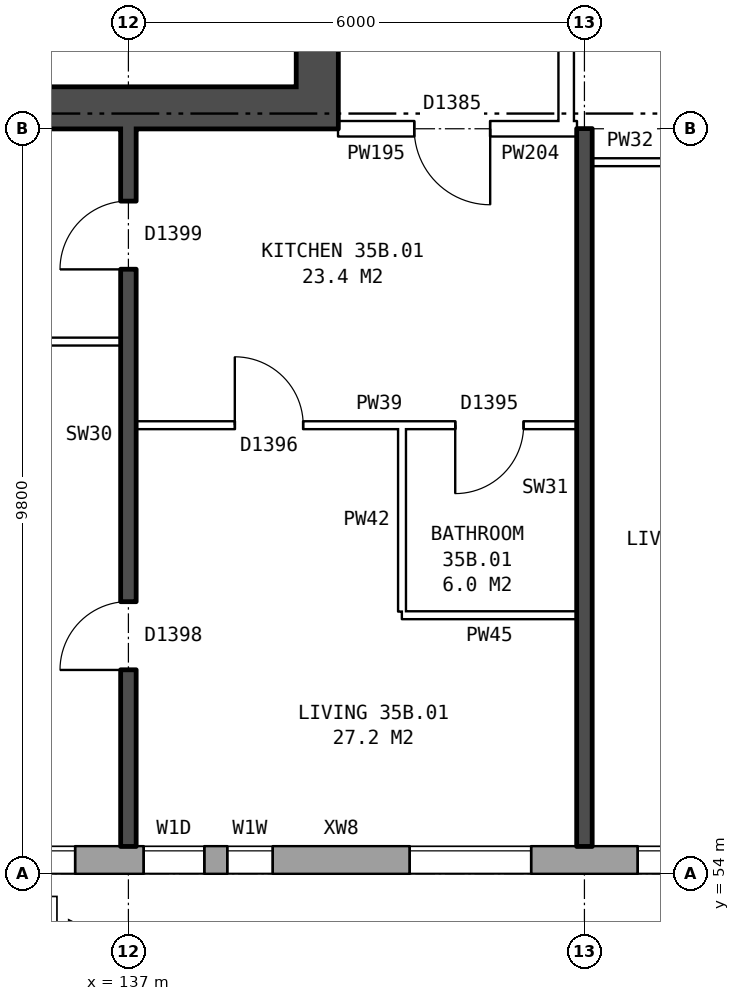
"""IFC4 building model, lengths in metres.
Left out: names, types, materials, properties, quantities, classifications, styles, units other than length and angle.
Written with IfcOpenShell. Run it as: python <this file> out.ifc"""

import sys

from ifc_helpers import new_model, si_unit, direction, frame, frame_2d, origin, place, context, subcontext, project, spatial, rectangle, extrude, element, fill, save


model = new_model("IFC4")
c1 = context("Model", 3, precision=1e-05, world=origin(), true_north=direction((0.0, 1.0)))
c2 = subcontext(c1, "Body", "Model", "MODEL_VIEW")
j1 = project(units=[si_unit("LENGTHUNIT", "METRE"), si_unit("PLANEANGLEUNIT", "RADIAN")], contexts=[c1])
p1 = place(None, origin())
s1 = spatial("IfcSite", under=j1, at=p1, CompositionType="ELEMENT")
p2 = place(p1, origin())
s2 = spatial("IfcBuilding", under=s1, at=p2, CompositionType="ELEMENT")
p3 = place(p2, frame((0.0, 0.0, 126.8)))
s3 = spatial("IfcBuildingStorey", under=s2, at=p3, CompositionType="ELEMENT", Elevation=126.8)
p4 = place(p3, frame((134.075, 54.18, 0.0), z_axis=(0.0, 0.0, 1.0), x_axis=(1.0, 0.0, 0.0)))
e1 = element("IfcWall", 1, at=p4, inside=s3, PredefinedType="STANDARD", context=c2, shape_type="SweptSolid", body=[
    extrude(rectangle(XDim=35.601, YDim=0.36, at=frame_2d((17.8, 0.0))), origin(), (0.0, 0.0, 1.0), 2.85),
])
p5 = place(p4, frame((0.625, 0.0, 0.8)))
e2 = element("IfcOpeningElement", 2, at=p5, cuts=e1, PredefinedType="OPENING", context=c2, shape_type="SweptSolid", body=[
    extrude(rectangle(XDim=1.6, YDim=1.8, at=frame_2d((0.8, 0.9))), frame((0.0, 0.19, 0.0), z_axis=(0.0, -1.0, 0.0), x_axis=(1.0, 0.0, 0.0)), (0.0, 0.0, 1.0), 0.38),
])
p6 = place(p4, frame((3.125, 0.0, 0.8)))
e3 = element("IfcOpeningElement", 3, at=p6, cuts=e1, PredefinedType="OPENING", context=c2, shape_type="SweptSolid", body=[
    extrude(rectangle(XDim=0.8, YDim=1.8, at=frame_2d((0.4, 0.9))), frame((0.0, 0.19, 0.0), z_axis=(0.0, -1.0, 0.0), x_axis=(1.0, 0.0, 0.0)), (0.0, 0.0, 1.0), 0.38),
])
p7 = place(p4, frame((6.625, 0.0, 0.8)))
e4 = element("IfcOpeningElement", 4, at=p7, cuts=e1, PredefinedType="OPENING", context=c2, shape_type="SweptSolid", body=[
    extrude(rectangle(XDim=1.6, YDim=1.8, at=frame_2d((0.8, 0.9))), frame((0.0, 0.19, 0.0), z_axis=(0.0, -1.0, 0.0), x_axis=(1.0, 0.0, 0.0)), (0.0, 0.0, 1.0), 0.38),
])
p8 = place(p4, frame((9.625, 0.0, 0.8)))
e5 = element("IfcOpeningElement", 5, at=p8, cuts=e1, PredefinedType="OPENING", context=c2, shape_type="SweptSolid", body=[
    extrude(rectangle(XDim=1.6, YDim=1.8, at=frame_2d((0.8, 0.9))), frame((0.0, 0.19, 0.0), z_axis=(0.0, -1.0, 0.0), x_axis=(1.0, 0.0, 0.0)), (0.0, 0.0, 1.0), 0.38),
])
p9 = place(p4, frame((12.625, 0.0, 0.8)))
e6 = element("IfcOpeningElement", 6, at=p9, cuts=e1, PredefinedType="OPENING", context=c2, shape_type="SweptSolid", body=[
    extrude(rectangle(XDim=1.6, YDim=1.8, at=frame_2d((0.8, 0.9))), frame((0.0, 0.19, 0.0), z_axis=(0.0, -1.0, 0.0), x_axis=(1.0, 0.0, 0.0)), (0.0, 0.0, 1.0), 0.38),
])
p10 = place(p4, frame((15.625, 0.0, 0.8)))
e7 = element("IfcOpeningElement", 7, at=p10, cuts=e1, PredefinedType="OPENING", context=c2, shape_type="SweptSolid", body=[
    extrude(rectangle(XDim=1.6, YDim=1.8, at=frame_2d((0.8, 0.9))), frame((0.0, 0.19, 0.0), z_axis=(0.0, -1.0, 0.0), x_axis=(1.0, 0.0, 0.0)), (0.0, 0.0, 1.0), 0.38),
])
p11 = place(p4, frame((18.625, 0.0, 0.8)))
e8 = element("IfcOpeningElement", 8, at=p11, cuts=e1, PredefinedType="OPENING", context=c2, shape_type="SweptSolid", body=[
    extrude(rectangle(XDim=1.6, YDim=1.8, at=frame_2d((0.8, 0.9))), frame((0.0, 0.19, 0.0), z_axis=(0.0, -1.0, 0.0), x_axis=(1.0, 0.0, 0.0)), (0.0, 0.0, 1.0), 0.38),
])
p12 = place(p4, frame((21.625, 0.0, 0.8)))
e9 = element("IfcOpeningElement", 9, at=p12, cuts=e1, PredefinedType="OPENING", context=c2, shape_type="SweptSolid", body=[
    extrude(rectangle(XDim=1.6, YDim=1.8, at=frame_2d((0.8, 0.9))), frame((0.0, 0.19, 0.0), z_axis=(0.0, -1.0, 0.0), x_axis=(1.0, 0.0, 0.0)), (0.0, 0.0, 1.0), 0.38),
])
p13 = place(p4, frame((24.625, 0.0, 0.8)))
e10 = element("IfcOpeningElement", 10, at=p13, cuts=e1, PredefinedType="OPENING", context=c2, shape_type="SweptSolid", body=[
    extrude(rectangle(XDim=1.6, YDim=1.8, at=frame_2d((0.8, 0.9))), frame((0.0, 0.19, 0.0), z_axis=(0.0, -1.0, 0.0), x_axis=(1.0, 0.0, 0.0)), (0.0, 0.0, 1.0), 0.38),
])
p14 = place(p4, frame((27.125, 0.0, 0.8)))
e11 = element("IfcOpeningElement", 11, at=p14, cuts=e1, PredefinedType="OPENING", context=c2, shape_type="SweptSolid", body=[
    extrude(rectangle(XDim=1.6, YDim=1.8, at=frame_2d((0.8, 0.9))), frame((0.0, 0.19, 0.0), z_axis=(0.0, -1.0, 0.0), x_axis=(1.0, 0.0, 0.0)), (0.0, 0.0, 1.0), 0.38),
])
p15 = place(p4, frame((29.025, 0.0, 0.8)))
e12 = element("IfcOpeningElement", 12, at=p15, cuts=e1, PredefinedType="OPENING", context=c2, shape_type="SweptSolid", body=[
    extrude(rectangle(XDim=0.6, YDim=0.9, at=frame_2d((0.3, 0.45))), frame((0.0, 0.19, 0.0), z_axis=(0.0, -1.0, 0.0), x_axis=(1.0, 0.0, 0.0)), (0.0, 0.0, 1.0), 0.38),
])
p16 = place(p4, frame((33.625, 0.0, 0.8)))
e13 = element("IfcOpeningElement", 13, at=p16, cuts=e1, PredefinedType="OPENING", context=c2, shape_type="SweptSolid", body=[
    extrude(rectangle(XDim=1.6, YDim=1.8, at=frame_2d((0.8, 0.9))), frame((0.0, 0.19, 0.0), z_axis=(0.0, -1.0, 0.0), x_axis=(1.0, 0.0, 0.0)), (0.0, 0.0, 1.0), 0.38),
])
p17 = place(p4, frame((4.225, 0.0, 1.6)))
e14 = element("IfcOpeningElement", 14, at=p17, cuts=e1, PredefinedType="OPENING", context=c2, shape_type="SweptSolid", body=[
    extrude(rectangle(XDim=0.6, YDim=0.9, at=frame_2d((0.3, 0.45))), frame((0.0, 0.19, 0.0), z_axis=(0.0, -1.0, 0.0), x_axis=(1.0, 0.0, 0.0)), (0.0, 0.0, 1.0), 0.38),
])
p18 = place(p4, frame((30.675, 0.0, 1.7)))
e15 = element("IfcOpeningElement", 15, at=p18, cuts=e1, PredefinedType="OPENING", context=c2, shape_type="SweptSolid", body=[
    extrude(rectangle(XDim=0.6, YDim=0.9, at=frame_2d((0.3, 0.45))), frame((0.0, 0.19, 0.0), z_axis=(0.0, -1.0, 0.0), x_axis=(1.0, 0.0, 0.0)), (0.0, 0.0, 1.0), 0.38),
])
p19 = place(p4, frame((31.575, 0.0, 0.8)))
e16 = element("IfcOpeningElement", 16, at=p19, cuts=e1, PredefinedType="OPENING", context=c2, shape_type="SweptSolid", body=[
    extrude(rectangle(XDim=1.0, YDim=1.8, at=frame_2d((0.5, 0.9))), frame((0.0, 0.19, 0.0), z_axis=(0.0, -1.0, 0.0), x_axis=(1.0, 0.0, 0.0)), (0.0, 0.0, 1.0), 0.38),
])
p20 = place(p3, frame((139.485, 63.8, 0.0), z_axis=(0.0, 0.0, 1.0), x_axis=(0.0, 1.0, 0.0)))
e17 = element("IfcWall", 17, at=p20, inside=s3, PredefinedType="SHEAR", context=c2, shape_type="SweptSolid", body=[
    extrude(rectangle(XDim=12.4, YDim=0.55, at=frame_2d((6.2, 0.0))), origin(), (0.0, 0.0, 1.0), 2.85),
])
p21 = place(p20, frame((1.325, 0.0, 0.0)))
e18 = element("IfcOpeningElement", 18, at=p21, cuts=e17, PredefinedType="OPENING", context=c2, shape_type="SweptSolid", body=[
    extrude(rectangle(XDim=1.1, YDim=2.1, at=frame_2d((0.55, 1.05))), frame((0.0, 0.285, 0.0), z_axis=(0.0, -1.0, 0.0), x_axis=(1.0, 0.0, 0.0)), (0.0, 0.0, 1.0), 0.57),
])
p22 = place(p20, frame((3.6, 0.0, 0.0)))
e19 = element("IfcOpeningElement", 19, at=p22, cuts=e17, PredefinedType="OPENING", context=c2, shape_type="SweptSolid", body=[
    extrude(rectangle(XDim=1.1, YDim=2.1, at=frame_2d((0.55, 1.05))), frame((0.0, 0.285, 0.0), z_axis=(0.0, -1.0, 0.0), x_axis=(1.0, 0.0, 0.0)), (0.0, 0.0, 1.0), 0.57),
])
p23 = place(p20, frame((5.8, 0.0, 0.0)))
e20 = element("IfcOpeningElement", 20, at=p23, cuts=e17, PredefinedType="OPENING", context=c2, shape_type="SweptSolid", body=[
    extrude(rectangle(XDim=1.1, YDim=2.1, at=frame_2d((0.55, 1.05))), frame((0.0, 0.285, 0.0), z_axis=(0.0, -1.0, 0.0), x_axis=(1.0, 0.0, 0.0)), (0.0, 0.0, 1.0), 0.57),
])
p24 = place(p20, frame((9.9, 0.0, 0.0)))
e21 = element("IfcOpeningElement", 21, at=p24, cuts=e17, PredefinedType="OPENING", context=c2, shape_type="SweptSolid", body=[
    extrude(rectangle(XDim=1.1, YDim=2.1, at=frame_2d((0.55, 1.05))), frame((0.0, 0.285, 0.0), z_axis=(0.0, -1.0, 0.0), x_axis=(1.0, 0.0, 0.0)), (0.0, 0.0, 1.0), 0.57),
])
p25 = place(p20, frame((8.125, 0.0, 0.0)))
e22 = element("IfcOpeningElement", 22, at=p25, cuts=e17, PredefinedType="OPENING", context=c2, shape_type="SweptSolid", body=[
    extrude(rectangle(XDim=0.85, YDim=2.1, at=frame_2d((0.425, 1.05))), frame((0.0, 0.285, 0.0), z_axis=(0.0, -1.0, 0.0), x_axis=(1.0, 0.0, 0.0)), (0.0, 0.0, 1.0), 0.57),
])
p26 = place(p3, frame((139.21, 64.075, 0.0), z_axis=(0.0, 0.0, 1.0), x_axis=(-1.0, 0.0, 0.0)))
e23 = element("IfcWall", 23, at=p26, inside=s3, PredefinedType="SHEAR", context=c2, shape_type="SweptSolid", body=[
    extrude(rectangle(XDim=7.3, YDim=0.55, at=frame_2d((3.65, 0.0))), origin(), (0.0, 0.0, 1.0), 2.85),
])
p27 = place(p3, frame((142.76, 63.9, 0.0), z_axis=(0.0, 0.0, 1.0), x_axis=(0.0, 1.0, 0.0)))
e24 = element("IfcWall", 24, at=p27, inside=s3, PredefinedType="PARTITIONING", context=c2, shape_type="SweptSolid", body=[
    extrude(rectangle(XDim=12.2, YDim=0.2, at=frame_2d((6.1, 0.0))), origin(), (0.0, 0.0, 1.0), 2.85),
])
p28 = place(p27, frame((5.1, 0.0, 0.0)))
e25 = element("IfcOpeningElement", 25, at=p28, cuts=e24, PredefinedType="OPENING", context=c2, shape_type="SweptSolid", body=[
    extrude(rectangle(XDim=2.0, YDim=2.1, at=frame_2d((1.0, 1.05))), frame((0.0, 0.11, 0.0), z_axis=(0.0, -1.0, 0.0), x_axis=(1.0, 0.0, 0.0)), (0.0, 0.0, 1.0), 0.22),
])
p29 = place(p3, frame((140.6, 57.4, 0.0), z_axis=(0.0, 0.0, 1.0), x_axis=(1.0, 0.0, 0.0)))
e26 = element("IfcWall", 26, at=p29, inside=s3, PredefinedType="PARTITIONING", context=c2, shape_type="SweptSolid", body=[
    extrude(rectangle(XDim=2.3, YDim=0.1, at=frame_2d((1.15, 0.0))), origin(), (0.0, 0.0, 1.0), 2.85),
])
p30 = place(p3, frame((137.1, 59.9, 0.0), z_axis=(0.0, 0.0, 1.0), x_axis=(1.0, 0.0, 0.0)))
e27 = element("IfcWall", 27, at=p30, inside=s3, PredefinedType="PARTITIONING", context=c2, shape_type="SweptSolid", body=[
    extrude(rectangle(XDim=5.8, YDim=0.1, at=frame_2d((2.9, 0.0))), origin(), (0.0, 0.0, 1.0), 2.85),
])
p31 = place(p30, frame((1.3, 0.0, 0.0)))
e28 = element("IfcOpeningElement", 28, at=p31, cuts=e27, PredefinedType="OPENING", context=c2, shape_type="SweptSolid", body=[
    extrude(rectangle(XDim=0.9, YDim=2.1, at=frame_2d((0.45, 1.05))), frame((0.0, 0.06, 0.0), z_axis=(0.0, -1.0, 0.0), x_axis=(1.0, 0.0, 0.0)), (0.0, 0.0, 1.0), 0.12),
])
p32 = place(p30, frame((4.2, 0.0, 0.0)))
e29 = element("IfcOpeningElement", 29, at=p32, cuts=e27, PredefinedType="OPENING", context=c2, shape_type="SweptSolid", body=[
    extrude(rectangle(XDim=0.9, YDim=2.1, at=frame_2d((0.45, 1.05))), frame((0.0, 0.06, 0.0), z_axis=(0.0, -1.0, 0.0), x_axis=(1.0, 0.0, 0.0)), (0.0, 0.0, 1.0), 0.12),
])
p33 = place(p3, frame((131.36, 61.0, 0.0), z_axis=(0.0, 0.0, 1.0), x_axis=(1.0, 0.0, 0.0)))
e30 = element("IfcWall", 30, at=p33, inside=s3, PredefinedType="PARTITIONING", context=c2, shape_type="SweptSolid", body=[
    extrude(rectangle(XDim=5.54, YDim=0.1, at=frame_2d((2.77, 0.0))), origin(), (0.0, 0.0, 1.0), 2.85),
])
p34 = place(p3, frame((143.1, 63.36, 0.0), z_axis=(0.0, 0.0, 1.0), x_axis=(1.0, 0.0, 0.0)))
e31 = element("IfcWall", 31, at=p34, inside=s3, PredefinedType="PARTITIONING", context=c2, shape_type="SweptSolid", body=[
    extrude(rectangle(XDim=2.9, YDim=0.1, at=frame_2d((1.45, 0.0))), origin(), (0.0, 0.0, 1.0), 2.85),
])
p35 = place(p34, frame((1.0, 0.0, 0.0)))
e32 = element("IfcOpeningElement", 32, at=p35, cuts=e31, PredefinedType="OPENING", context=c2, shape_type="SweptSolid", body=[
    extrude(rectangle(XDim=0.9, YDim=2.1, at=frame_2d((0.45, 1.05))), frame((0.0, 0.06, 0.0), z_axis=(0.0, -1.0, 0.0), x_axis=(1.0, 0.0, 0.0)), (0.0, 0.0, 1.0), 0.12),
])
p36 = place(p3, frame((139.76, 63.8, 0.0), z_axis=(0.0, 0.0, 1.0), x_axis=(1.0, 0.0, 0.0)))
e33 = element("IfcWall", 33, at=p36, inside=s3, PredefinedType="PARTITIONING", context=c2, shape_type="SweptSolid", body=[
    extrude(rectangle(XDim=3.0, YDim=0.2, at=frame_2d((1.5, 0.0))), origin(), (0.0, 0.0, 1.0), 2.85),
])
p37 = place(p36, frame((1.0, 0.0, 0.0)))
e34 = element("IfcOpeningElement", 34, at=p37, cuts=e33, PredefinedType="OPENING", context=c2, shape_type="SweptSolid", body=[
    extrude(rectangle(XDim=1.0, YDim=2.1, at=frame_2d((0.5, 1.05))), frame((0.0, 0.11, 0.0), z_axis=(0.0, -1.0, 0.0), x_axis=(1.0, 0.0, 0.0)), (0.0, 0.0, 1.0), 0.22),
])
p38 = place(p3, frame((142.76, 63.8, 0.0), z_axis=(0.0, 0.0, 1.0), x_axis=(1.0, 0.0, 0.0)))
e35 = element("IfcWall", 35, at=p38, inside=s3, PredefinedType="PARTITIONING", context=c2, shape_type="SweptSolid", body=[
    extrude(rectangle(XDim=0.14, YDim=0.2, at=frame_2d((0.07, 0.0))), origin(), (0.0, 0.0, 1.0), 2.85),
])
p39 = place(p3, frame((137.0, 54.36, 0.0), z_axis=(0.0, 0.0, 1.0), x_axis=(0.0, 1.0, 0.0)))
e36 = element("IfcWall", 36, at=p39, inside=s3, PredefinedType="SOLIDWALL", context=c2, shape_type="SweptSolid", body=[
    extrude(rectangle(XDim=9.44, YDim=0.2, at=frame_2d((4.72, 0.0))), origin(), (0.0, 0.0, 1.0), 2.85),
])
p40 = place(p39, frame((2.32, 0.0, 0.0)))
e37 = element("IfcOpeningElement", 37, at=p40, cuts=e36, PredefinedType="OPENING", context=c2, shape_type="SweptSolid", body=[
    extrude(rectangle(XDim=0.9, YDim=2.1, at=frame_2d((0.45, 1.05))), frame((0.0, 0.11, 0.0), z_axis=(0.0, -1.0, 0.0), x_axis=(1.0, 0.0, 0.0)), (0.0, 0.0, 1.0), 0.22),
])
p41 = place(p39, frame((7.59, 0.0, 0.0)))
e38 = element("IfcOpeningElement", 38, at=p41, cuts=e36, PredefinedType="OPENING", context=c2, shape_type="SweptSolid", body=[
    extrude(rectangle(XDim=0.9, YDim=2.1, at=frame_2d((0.45, 1.05))), frame((0.0, 0.11, 0.0), z_axis=(0.0, -1.0, 0.0), x_axis=(1.0, 0.0, 0.0)), (0.0, 0.0, 1.0), 0.22),
])
p42 = place(p3, frame((140.6, 57.45, 0.0), z_axis=(0.0, 0.0, 1.0), x_axis=(0.0, 1.0, 0.0)))
e39 = element("IfcWall", 39, at=p42, inside=s3, PredefinedType="PARTITIONING", context=c2, shape_type="SweptSolid", body=[
    extrude(rectangle(XDim=2.4, YDim=0.1, at=frame_2d((1.2, 0.0))), origin(), (0.0, 0.0, 1.0), 2.85),
])
p43 = place(p3, frame((143.0, 54.36, 0.0), z_axis=(0.0, 0.0, 1.0), x_axis=(0.0, 1.0, 0.0)))
e40 = element("IfcWall", 40, at=p43, inside=s3, PredefinedType="SOLIDWALL", context=c2, shape_type="SweptSolid", body=[
    extrude(rectangle(XDim=9.44, YDim=0.2, at=frame_2d((4.72, 0.0))), origin(), (0.0, 0.0, 1.0), 2.85),
])
p44 = place(p5, origin())
e41 = element("IfcWindow", 41, at=p44, inside=s3, PartitioningType="SINGLE_PANEL", PredefinedType="WINDOW", context=c2, shape_type="SweptSolid", body=[
    extrude(rectangle(XDim=1.6, YDim=1.8, at=frame_2d((0.8, 0.9))), frame((0.0, 0.15, 0.0), z_axis=(0.0, -1.0, 0.0), x_axis=(1.0, 0.0, 0.0)), (0.0, 0.0, 1.0), 0.06),
])
fill(e2, e41)
p45 = place(p6, origin())
e42 = element("IfcWindow", 42, at=p45, inside=s3, PartitioningType="SINGLE_PANEL", PredefinedType="WINDOW", context=c2, shape_type="SweptSolid", body=[
    extrude(rectangle(XDim=0.8, YDim=1.8, at=frame_2d((0.4, 0.9))), frame((0.0, 0.15, 0.0), z_axis=(0.0, -1.0, 0.0), x_axis=(1.0, 0.0, 0.0)), (0.0, 0.0, 1.0), 0.06),
])
fill(e3, e42)
p46 = place(p7, origin())
e43 = element("IfcWindow", 43, at=p46, inside=s3, PartitioningType="SINGLE_PANEL", PredefinedType="WINDOW", context=c2, shape_type="SweptSolid", body=[
    extrude(rectangle(XDim=1.6, YDim=1.8, at=frame_2d((0.8, 0.9))), frame((0.0, 0.15, 0.0), z_axis=(0.0, -1.0, 0.0), x_axis=(1.0, 0.0, 0.0)), (0.0, 0.0, 1.0), 0.06),
])
fill(e4, e43)
p47 = place(p8, origin())
e44 = element("IfcWindow", 44, at=p47, inside=s3, PartitioningType="SINGLE_PANEL", PredefinedType="WINDOW", context=c2, shape_type="SweptSolid", body=[
    extrude(rectangle(XDim=1.6, YDim=1.8, at=frame_2d((0.8, 0.9))), frame((0.0, 0.15, 0.0), z_axis=(0.0, -1.0, 0.0), x_axis=(1.0, 0.0, 0.0)), (0.0, 0.0, 1.0), 0.06),
])
fill(e5, e44)
p48 = place(p40, origin())
e45 = element("IfcDoor", 45, at=p48, inside=s3, OperationType="SINGLE_SWING_LEFT", PredefinedType="DOOR", context=c2, shape_type="SweptSolid", body=[
    extrude(rectangle(XDim=0.9, YDim=2.1, at=frame_2d((0.45, 1.05))), frame((0.0, 0.025, 0.0), z_axis=(0.0, -1.0, 0.0), x_axis=(1.0, 0.0, 0.0)), (0.0, 0.0, 1.0), 0.05),
])
fill(e37, e45)
p49 = place(p41, origin())
e46 = element("IfcDoor", 46, at=p49, inside=s3, OperationType="SINGLE_SWING_LEFT", PredefinedType="DOOR", context=c2, shape_type="SweptSolid", body=[
    extrude(rectangle(XDim=0.9, YDim=2.1, at=frame_2d((0.45, 1.05))), frame((0.0, 0.025, 0.0), z_axis=(0.0, -1.0, 0.0), x_axis=(1.0, 0.0, 0.0)), (0.0, 0.0, 1.0), 0.05),
])
fill(e38, e46)
p50 = place(p37, frame((1.0, 0.0, 0.0), z_axis=(0.0, 0.0, 1.0), x_axis=(-1.0, 0.0, 0.0)))
e47 = element("IfcDoor", 47, at=p50, inside=s3, OperationType="SINGLE_SWING_LEFT", PredefinedType="DOOR", context=c2, shape_type="SweptSolid", body=[
    extrude(rectangle(XDim=1.0, YDim=2.1, at=frame_2d((0.5, 1.05))), frame((0.0, 0.025, 0.0), z_axis=(0.0, -1.0, 0.0), x_axis=(1.0, 0.0, 0.0)), (0.0, 0.0, 1.0), 0.05),
])
fill(e34, e47)
p51 = place(p31, origin())
e48 = element("IfcDoor", 48, at=p51, inside=s3, OperationType="SINGLE_SWING_LEFT", PredefinedType="DOOR", context=c2, shape_type="SweptSolid", body=[
    extrude(rectangle(XDim=0.9, YDim=2.1, at=frame_2d((0.45, 1.05))), frame((0.0, 0.025, 0.0), z_axis=(0.0, -1.0, 0.0), x_axis=(1.0, 0.0, 0.0)), (0.0, 0.0, 1.0), 0.05),
])
fill(e28, e48)
p52 = place(p32, frame((0.9, 0.0, 0.0), z_axis=(0.0, 0.0, 1.0), x_axis=(-1.0, 0.0, 0.0)))
e49 = element("IfcDoor", 49, at=p52, inside=s3, OperationType="SINGLE_SWING_RIGHT", PredefinedType="DOOR", context=c2, shape_type="SweptSolid", body=[
    extrude(rectangle(XDim=0.9, YDim=2.1, at=frame_2d((0.45, 1.05))), frame((0.0, 0.025, 0.0), z_axis=(0.0, -1.0, 0.0), x_axis=(1.0, 0.0, 0.0)), (0.0, 0.0, 1.0), 0.05),
])
fill(e29, e49)
p53 = place(p17, origin())
e50 = element("IfcWindow", 50, at=p53, inside=s3, PartitioningType="SINGLE_PANEL", PredefinedType="WINDOW", context=c2, shape_type="SweptSolid", body=[
    extrude(rectangle(XDim=0.6, YDim=0.9, at=frame_2d((0.3, 0.45))), frame((0.0, 0.15, 0.0), z_axis=(0.0, -1.0, 0.0), x_axis=(1.0, 0.0, 0.0)), (0.0, 0.0, 1.0), 0.06),
])
fill(e14, e50)
save(model, sys.argv[1])
